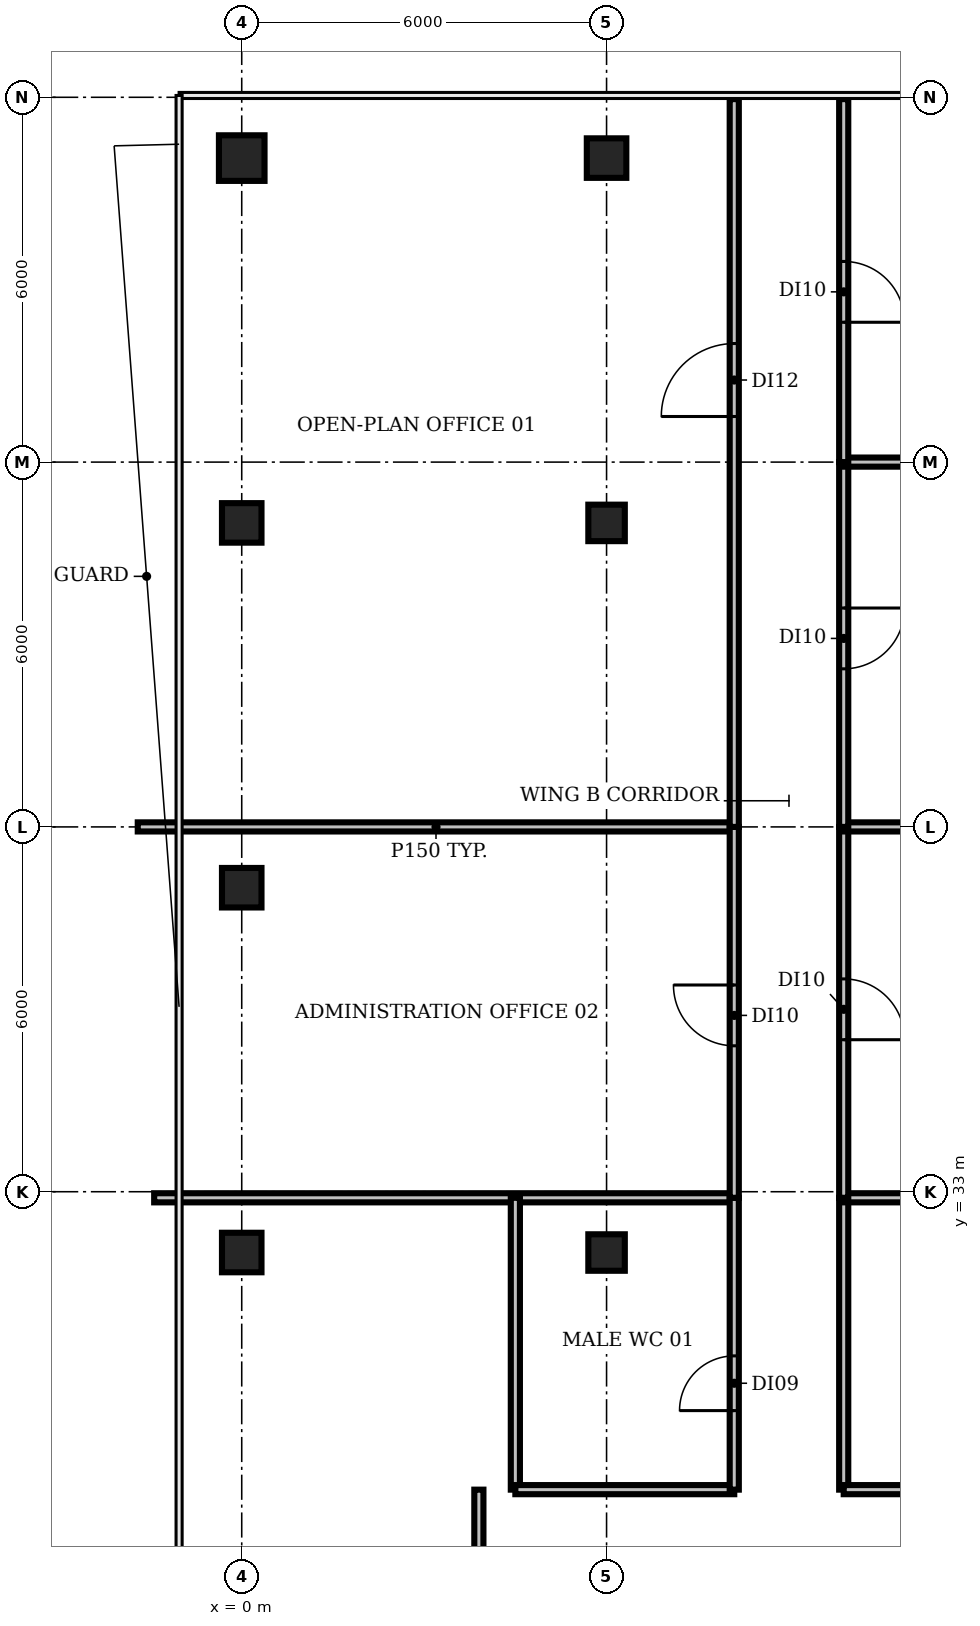
"""IFC4 building model, lengths in metres.
Left out: names, types, materials, properties, quantities, classifications, styles, units other than length and angle.
Written with IfcOpenShell. Run it as: python <this file> out.ifc"""

import sys

from ifc_helpers import new_model, si_unit, direction, frame, frame_2d, origin, origin_2d, place, context, subcontext, project, spatial, rectangle, circle, extrude, element, fill, save


model = new_model("IFC4")
c1 = context("Model", 3, precision=1e-05, world=origin(), true_north=direction((0.0, 1.0)))
c2 = subcontext(c1, "Body", "Model", "MODEL_VIEW")
j1 = project(units=[si_unit("LENGTHUNIT", "METRE"), si_unit("PLANEANGLEUNIT", "RADIAN")], contexts=[c1])
p1 = place(None, origin())
s1 = spatial("IfcSite", under=j1, at=p1, CompositionType="ELEMENT")
p2 = place(p1, origin())
s2 = spatial("IfcBuilding", under=s1, at=p2, CompositionType="ELEMENT")
p3 = place(p2, frame((0.0, 0.0, 323.0)))
s3 = spatial("IfcBuildingStorey", under=s2, at=p3, CompositionType="ELEMENT", Elevation=323.0)
for number, where, z_axis, x_axis in (
    (1, (0.0, 32.0, 0.0), (0.0, 0.0, 1.0), (1.0, 0.0, 0.0)),
    (2, (0.0, 38.0, 0.0), (0.0, 0.0, 1.0), (1.0, 0.0, 0.0)),
    (3, (0.0, 44.0, 0.0), (0.0, 0.0, 1.0), (1.0, 0.0, 0.0)),
):
    element("IfcColumn", number, at=place(p3, frame(where, z_axis=z_axis, x_axis=x_axis)), inside=s3, PredefinedType="COLUMN", context=c2, shape_type="SweptSolid", body=[
        extrude(rectangle(XDim=0.65, YDim=0.65, at=origin_2d()), origin(), (0.0, 0.0, 1.0), 3.9),
    ])
p4 = place(p3, frame((0.0, 50.0, 0.0), z_axis=(0.0, 0.0, 1.0), x_axis=(1.0, 0.0, 0.0)))
e4 = element("IfcColumn", 4, at=p4, inside=s3, PredefinedType="COLUMN", context=c2, shape_type="SweptSolid", body=[
    extrude(circle(Radius=0.375, at=origin_2d()), origin(), (0.0, 0.0, 1.0), 3.9),
])
for number, where, z_axis, x_axis in (
    (5, (6.0, 32.0, 0.0), (0.0, 0.0, 1.0), (1.0, 0.0, 0.0)),
    (6, (6.0, 44.0, 0.0), (0.0, 0.0, 1.0), (1.0, 0.0, 0.0)),
):
    element("IfcColumn", number, at=place(p3, frame(where, z_axis=z_axis, x_axis=x_axis)), inside=s3, PredefinedType="COLUMN", context=c2, shape_type="SweptSolid", body=[
        extrude(rectangle(XDim=0.6, YDim=0.6, at=origin_2d()), origin(), (0.0, 0.0, 1.0), 3.9),
    ])
p5 = place(p3, frame((6.0, 50.0, 0.0), z_axis=(0.0, 0.0, 1.0), x_axis=(1.0, 0.0, 0.0)))
e7 = element("IfcColumn", 7, at=p5, inside=s3, PredefinedType="COLUMN", context=c2, shape_type="SweptSolid", body=[
    extrude(rectangle(XDim=0.65, YDim=0.65, at=origin_2d()), origin(), (0.0, 0.0, 1.0), 3.9),
])
p6 = place(p3, frame((-1.71, 39.0, 0.0), z_axis=(0.0, 0.0, 1.0), x_axis=(1.0, 0.0, 0.0)))
e8 = element("IfcWall", 8, at=p6, inside=s3, PredefinedType="PARTITIONING", context=c2, shape_type="SweptSolid", body=[
    extrude(rectangle(XDim=9.81, YDim=0.15, at=frame_2d((4.905, 0.0))), origin(), (0.0, 0.0, 1.0), 2.48),
])
p7 = place(p3, frame((-1.44, 32.9, 0.0), z_axis=(0.0, 0.0, 1.0), x_axis=(1.0, 0.0, 0.0)))
e9 = element("IfcWall", 9, at=p7, inside=s3, PredefinedType="PARTITIONING", context=c2, shape_type="SweptSolid", body=[
    extrude(rectangle(XDim=9.54, YDim=0.15, at=frame_2d((4.77, 0.0))), origin(), (0.0, 0.0, 1.0), 2.48),
])
p8 = place(p3, frame((3.9, 22.5, 0.0), z_axis=(0.0, 0.0, 1.0), x_axis=(0.0, 1.0, 0.0)))
e10 = element("IfcWall", 10, at=p8, inside=s3, PredefinedType="PARTITIONING", context=c2, shape_type="SweptSolid", body=[
    extrude(rectangle(XDim=5.6, YDim=0.15, at=frame_2d((2.8, 0.0))), origin(), (0.0, 0.0, 1.0), 2.48),
])
p9 = place(p3, frame((4.5, 28.1, 0.0), z_axis=(0.0, 0.0, 1.0), x_axis=(0.0, 1.0, 0.0)))
e11 = element("IfcWall", 11, at=p9, inside=s3, PredefinedType="PARTITIONING", context=c2, shape_type="SweptSolid", body=[
    extrude(rectangle(XDim=4.8, YDim=0.15, at=frame_2d((2.4, 0.0))), origin(), (0.0, 0.0, 1.0), 2.48),
])
p10 = place(p3, frame((4.5, 28.1, 0.0), z_axis=(0.0, 0.0, 1.0), x_axis=(1.0, 0.0, 0.0)))
e12 = element("IfcWall", 12, at=p10, inside=s3, PredefinedType="PARTITIONING", context=c2, shape_type="SweptSolid", body=[
    extrude(rectangle(XDim=3.6, YDim=0.15, at=frame_2d((1.8, 0.0))), origin(), (0.0, 0.0, 1.0), 2.48),
])
p11 = place(p3, frame((8.1, 28.1, 0.0), z_axis=(0.0, 0.0, 1.0), x_axis=(0.0, 1.0, 0.0)))
e13 = element("IfcWall", 13, at=p11, inside=s3, PredefinedType="PARTITIONING", context=c2, shape_type="SweptSolid", body=[
    extrude(rectangle(XDim=4.8, YDim=0.15, at=frame_2d((2.4, 0.0))), origin(), (0.0, 0.0, 1.0), 2.48),
])
p12 = place(p11, frame((1.3, 0.0, 0.0)))
e14 = element("IfcOpeningElement", 14, at=p12, cuts=e13, PredefinedType="OPENING", context=c2, shape_type="SweptSolid", body=[
    extrude(rectangle(XDim=0.9, YDim=2.1, at=frame_2d((0.45, 1.05))), frame((0.0, 0.085, 0.0), z_axis=(0.0, -1.0, 0.0), x_axis=(1.0, 0.0, 0.0)), (0.0, 0.0, 1.0), 0.17),
])
p13 = place(p3, frame((8.1, 32.9, 0.0), z_axis=(0.0, 0.0, 1.0), x_axis=(0.0, 1.0, 0.0)))
e15 = element("IfcWall", 15, at=p13, inside=s3, PredefinedType="PARTITIONING", context=c2, shape_type="SweptSolid", body=[
    extrude(rectangle(XDim=6.1, YDim=0.15, at=frame_2d((3.05, 0.0))), origin(), (0.0, 0.0, 1.0), 2.48),
])
p14 = place(p13, frame((2.5, 0.0, 0.0)))
e16 = element("IfcOpeningElement", 16, at=p14, cuts=e15, PredefinedType="OPENING", context=c2, shape_type="SweptSolid", body=[
    extrude(rectangle(XDim=1.0, YDim=2.1, at=frame_2d((0.5, 1.05))), frame((0.0, 0.085, 0.0), z_axis=(0.0, -1.0, 0.0), x_axis=(1.0, 0.0, 0.0)), (0.0, 0.0, 1.0), 0.17),
])
p15 = place(p3, frame((8.1, 39.0, 0.0), z_axis=(0.0, 0.0, 1.0), x_axis=(0.0, 1.0, 0.0)))
e17 = element("IfcWall", 17, at=p15, inside=s3, PredefinedType="PARTITIONING", context=c2, shape_type="SweptSolid", body=[
    extrude(rectangle(XDim=11.97, YDim=0.15, at=frame_2d((5.985, 0.0))), origin(), (0.0, 0.0, 1.0), 2.48),
])
p16 = place(p15, frame((6.75, 0.0, 0.0)))
e18 = element("IfcOpeningElement", 18, at=p16, cuts=e17, PredefinedType="OPENING", context=c2, shape_type="SweptSolid", body=[
    extrude(rectangle(XDim=1.2, YDim=2.1, at=frame_2d((0.6, 1.05))), frame((0.0, 0.085, 0.0), z_axis=(0.0, -1.0, 0.0), x_axis=(1.0, 0.0, 0.0)), (0.0, 0.0, 1.0), 0.17),
])
p17 = place(p3, frame((9.9, 28.1, 0.0), z_axis=(0.0, 0.0, 1.0), x_axis=(0.0, 1.0, 0.0)))
e19 = element("IfcWall", 19, at=p17, inside=s3, PredefinedType="PARTITIONING", context=c2, shape_type="SweptSolid", body=[
    extrude(rectangle(XDim=4.8, YDim=0.15, at=frame_2d((2.4, 0.0))), origin(), (0.0, 0.0, 1.0), 2.48),
])
p18 = place(p3, frame((9.9, 28.1, 0.0), z_axis=(0.0, 0.0, 1.0), x_axis=(1.0, 0.0, 0.0)))
e20 = element("IfcWall", 20, at=p18, inside=s3, PredefinedType="PARTITIONING", context=c2, shape_type="SweptSolid", body=[
    extrude(rectangle(XDim=4.5, YDim=0.15, at=frame_2d((2.25, 0.0))), origin(), (0.0, 0.0, 1.0), 2.48),
])
p19 = place(p3, frame((9.9, 32.9, 0.0), z_axis=(0.0, 0.0, 1.0), x_axis=(1.0, 0.0, 0.0)))
e21 = element("IfcWall", 21, at=p19, inside=s3, PredefinedType="PARTITIONING", context=c2, shape_type="SweptSolid", body=[
    extrude(rectangle(XDim=15.075, YDim=0.15, at=frame_2d((7.538, 0.0))), origin(), (0.0, 0.0, 1.0), 2.48),
])
p20 = place(p3, frame((9.9, 39.0, 0.0), z_axis=(0.0, 0.0, 1.0), x_axis=(0.0, -1.0, 0.0)))
e22 = element("IfcWall", 22, at=p20, inside=s3, PredefinedType="PARTITIONING", context=c2, shape_type="SweptSolid", body=[
    extrude(rectangle(XDim=6.1, YDim=0.15, at=frame_2d((3.05, 0.0))), origin(), (0.0, 0.0, 1.0), 2.48),
])
p21 = place(p20, frame((2.5, 0.0, 0.0)))
e23 = element("IfcOpeningElement", 23, at=p21, cuts=e22, PredefinedType="OPENING", context=c2, shape_type="SweptSolid", body=[
    extrude(rectangle(XDim=1.0, YDim=2.1, at=frame_2d((0.5, 1.05))), frame((0.0, 0.085, 0.0), z_axis=(0.0, -1.0, 0.0), x_axis=(1.0, 0.0, 0.0)), (0.0, 0.0, 1.0), 0.17),
])
p22 = place(p3, frame((9.9, 39.0, 0.0), z_axis=(0.0, 0.0, 1.0), x_axis=(1.0, 0.0, 0.0)))
e24 = element("IfcWall", 24, at=p22, inside=s3, PredefinedType="PARTITIONING", context=c2, shape_type="SweptSolid", body=[
    extrude(rectangle(XDim=15.075, YDim=0.15, at=frame_2d((7.538, 0.0))), origin(), (0.0, 0.0, 1.0), 2.48),
])
p23 = place(p3, frame((9.9, 45.0, 0.0), z_axis=(0.0, 0.0, 1.0), x_axis=(0.0, -1.0, 0.0)))
e25 = element("IfcWall", 25, at=p23, inside=s3, PredefinedType="PARTITIONING", context=c2, shape_type="SweptSolid", body=[
    extrude(rectangle(XDim=6.0, YDim=0.15, at=frame_2d((3.0, 0.0))), origin(), (0.0, 0.0, 1.0), 2.48),
])
p24 = place(p23, frame((2.4, 0.0, 0.0)))
e26 = element("IfcOpeningElement", 26, at=p24, cuts=e25, PredefinedType="OPENING", context=c2, shape_type="SweptSolid", body=[
    extrude(rectangle(XDim=1.0, YDim=2.1, at=frame_2d((0.5, 1.05))), frame((0.0, 0.085, 0.0), z_axis=(0.0, -1.0, 0.0), x_axis=(1.0, 0.0, 0.0)), (0.0, 0.0, 1.0), 0.17),
])
p25 = place(p3, frame((9.9, 45.0, 0.0), z_axis=(0.0, 0.0, 1.0), x_axis=(1.0, 0.0, 0.0)))
e27 = element("IfcWall", 27, at=p25, inside=s3, PredefinedType="PARTITIONING", context=c2, shape_type="SweptSolid", body=[
    extrude(rectangle(XDim=15.075, YDim=0.15, at=frame_2d((7.538, 0.0))), origin(), (0.0, 0.0, 1.0), 2.48),
])
p26 = place(p3, frame((9.9, 50.97, 0.0), z_axis=(0.0, 0.0, 1.0), x_axis=(0.0, -1.0, 0.0)))
e28 = element("IfcWall", 28, at=p26, inside=s3, PredefinedType="PARTITIONING", context=c2, shape_type="SweptSolid", body=[
    extrude(rectangle(XDim=5.97, YDim=0.15, at=frame_2d((2.985, 0.0))), origin(), (0.0, 0.0, 1.0), 2.48),
])
p27 = place(p26, frame((2.67, 0.0, 0.0)))
e29 = element("IfcOpeningElement", 29, at=p27, cuts=e28, PredefinedType="OPENING", context=c2, shape_type="SweptSolid", body=[
    extrude(rectangle(XDim=1.0, YDim=2.1, at=frame_2d((0.5, 1.05))), frame((0.0, 0.085, 0.0), z_axis=(0.0, -1.0, 0.0), x_axis=(1.0, 0.0, 0.0)), (0.0, 0.0, 1.0), 0.17),
])
p28 = place(p12, origin())
e30 = element("IfcDoor", 30, at=p28, inside=s3, OperationType="SINGLE_SWING_LEFT", PredefinedType="DOOR", context=c2, shape_type="SweptSolid", body=[
    extrude(rectangle(XDim=0.9, YDim=2.1, at=frame_2d((0.45, 1.05))), frame((0.0, 0.025, 0.0), z_axis=(0.0, -1.0, 0.0), x_axis=(1.0, 0.0, 0.0)), (0.0, 0.0, 1.0), 0.05),
])
fill(e14, e30)
p29 = place(p14, origin())
e31 = element("IfcDoor", 31, at=p29, inside=s3, OperationType="SINGLE_SWING_RIGHT", PredefinedType="DOOR", context=c2, shape_type="SweptSolid", body=[
    extrude(rectangle(XDim=1.0, YDim=2.1, at=frame_2d((0.5, 1.05))), frame((0.0, 0.025, 0.0), z_axis=(0.0, -1.0, 0.0), x_axis=(1.0, 0.0, 0.0)), (0.0, 0.0, 1.0), 0.05),
])
fill(e16, e31)
p30 = place(p16, origin())
e32 = element("IfcDoor", 32, at=p30, inside=s3, OperationType="SINGLE_SWING_LEFT", PredefinedType="DOOR", context=c2, shape_type="SweptSolid", body=[
    extrude(rectangle(XDim=1.2, YDim=2.1, at=frame_2d((0.6, 1.05))), frame((0.0, 0.025, 0.0), z_axis=(0.0, -1.0, 0.0), x_axis=(1.0, 0.0, 0.0)), (0.0, 0.0, 1.0), 0.05),
])
fill(e18, e32)
p31 = place(p21, origin())
e33 = element("IfcDoor", 33, at=p31, inside=s3, OperationType="SINGLE_SWING_RIGHT", PredefinedType="DOOR", context=c2, shape_type="SweptSolid", body=[
    extrude(rectangle(XDim=1.0, YDim=2.1, at=frame_2d((0.5, 1.05))), frame((0.0, 0.025, 0.0), z_axis=(0.0, -1.0, 0.0), x_axis=(1.0, 0.0, 0.0)), (0.0, 0.0, 1.0), 0.05),
])
fill(e23, e33)
p32 = place(p24, origin())
e34 = element("IfcDoor", 34, at=p32, inside=s3, OperationType="SINGLE_SWING_LEFT", PredefinedType="DOOR", context=c2, shape_type="SweptSolid", body=[
    extrude(rectangle(XDim=1.0, YDim=2.1, at=frame_2d((0.5, 1.05))), frame((0.0, 0.025, 0.0), z_axis=(0.0, -1.0, 0.0), x_axis=(1.0, 0.0, 0.0)), (0.0, 0.0, 1.0), 0.05),
])
fill(e26, e34)
p33 = place(p27, origin())
e35 = element("IfcDoor", 35, at=p33, inside=s3, OperationType="SINGLE_SWING_RIGHT", PredefinedType="DOOR", context=c2, shape_type="SweptSolid", body=[
    extrude(rectangle(XDim=1.0, YDim=2.1, at=frame_2d((0.5, 1.05))), frame((0.0, 0.025, 0.0), z_axis=(0.0, -1.0, 0.0), x_axis=(1.0, 0.0, 0.0)), (0.0, 0.0, 1.0), 0.05),
])
fill(e29, e35)
save(model, sys.argv[1])
